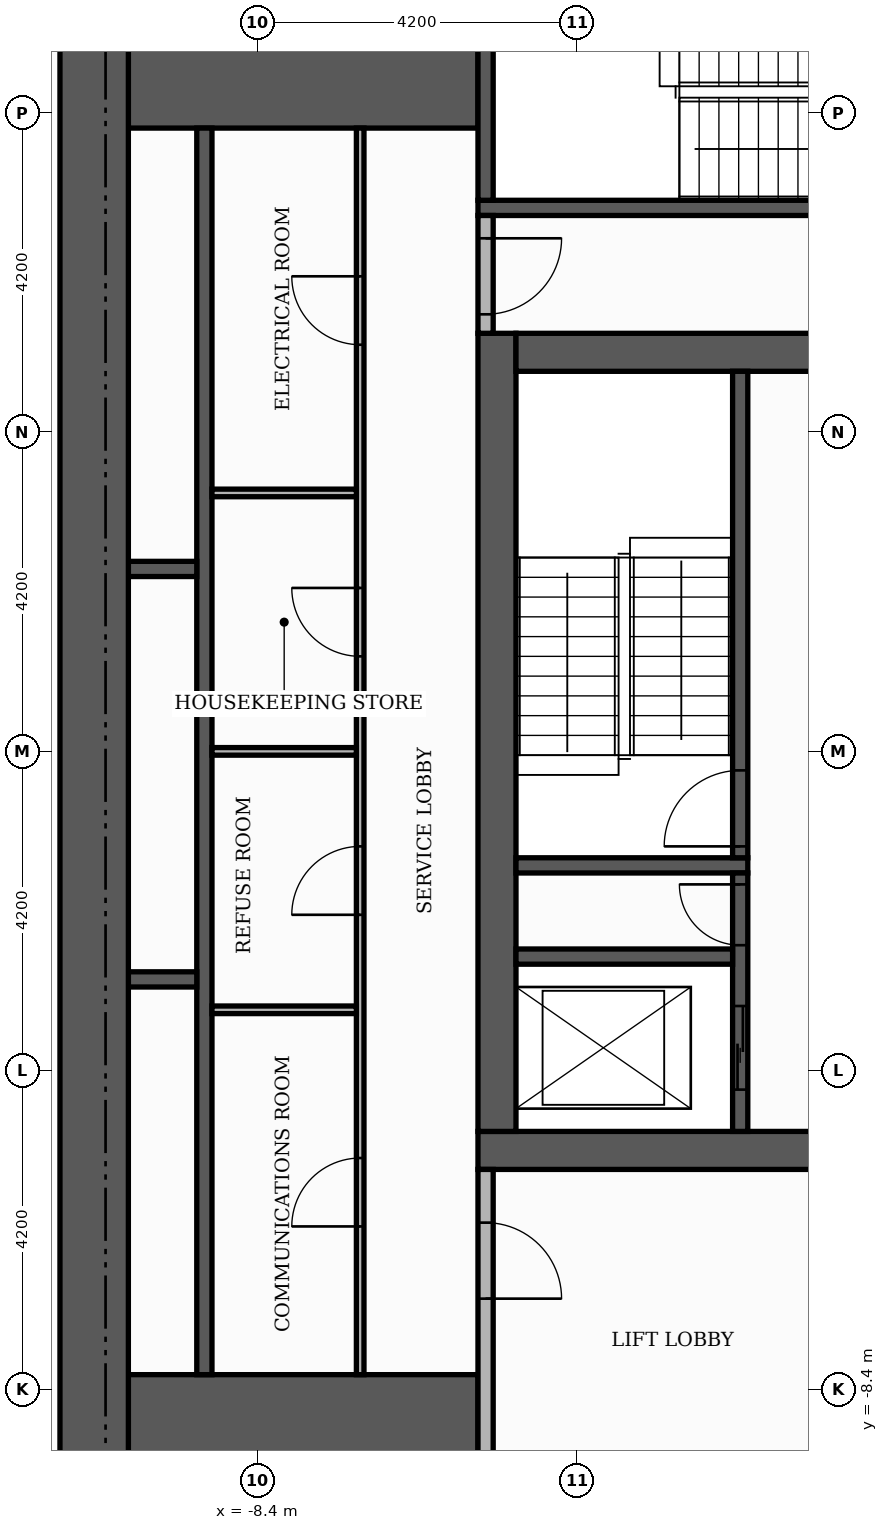
"""IFC4 building model, lengths in metres.
Left out: names, types, materials, properties, quantities, classifications, styles, units other than length and angle.
Written with IfcOpenShell. Run it as: python <this file> out.ifc"""

import sys

from ifc_helpers import new_model, si_unit, direction, frame, frame_2d, origin, place, context, subcontext, project, spatial, rectangle, extrude, element, fill, save


model = new_model("IFC4")
c1 = context("Model", 3, precision=1e-05, world=origin(), true_north=direction((0.0, 1.0)))
c2 = subcontext(c1, "Body", "Model", "MODEL_VIEW")
j1 = project(units=[si_unit("LENGTHUNIT", "METRE"), si_unit("PLANEANGLEUNIT", "RADIAN")], contexts=[c1])
p1 = place(None, origin())
s1 = spatial("IfcSite", under=j1, at=p1, CompositionType="ELEMENT")
p2 = place(p1, origin())
s2 = spatial("IfcBuilding", under=s1, at=p2, CompositionType="ELEMENT")
p3 = place(p2, frame((0.0, 0.0, 200.1)))
s3 = spatial("IfcBuildingStorey", under=s2, at=p3, CompositionType="ELEMENT", Elevation=200.1)
p4 = place(p3, frame((-5.5, -5.25, 0.0), z_axis=(0.0, 0.0, 1.0), x_axis=(1.0, 0.0, 0.0)))
e1 = element("IfcWall", 1, at=p4, inside=s3, PredefinedType="SHEAR", context=c2, shape_type="SweptSolid", body=[
    extrude(rectangle(XDim=11.0, YDim=0.5, at=frame_2d((5.5, 0.0))), origin(), (0.0, 0.0, 1.0), 3.48),
])
p5 = place(p4, frame((4.9, 0.0, 0.0)))
e2 = element("IfcOpeningElement", 2, at=p5, cuts=e1, PredefinedType="OPENING", context=c2, shape_type="SweptSolid", body=[
    extrude(rectangle(XDim=1.2, YDim=2.1, at=frame_2d((0.6, 1.05))), frame((0.0, 0.26, 0.0), z_axis=(0.0, -1.0, 0.0), x_axis=(1.0, 0.0, 0.0)), (0.0, 0.0, 1.0), 0.52),
])
p6 = place(p3, frame((-5.25, -5.0, 0.0), z_axis=(0.0, 0.0, 1.0), x_axis=(0.0, 1.0, 0.0)))
e3 = element("IfcWall", 3, at=p6, inside=s3, PredefinedType="SHEAR", context=c2, shape_type="SweptSolid", body=[
    extrude(rectangle(XDim=10.5, YDim=0.5, at=frame_2d((5.25, 0.0))), origin(), (0.0, 0.0, 1.0), 3.48),
])
p7 = place(p3, frame((-5.0, 5.25, 0.0), z_axis=(0.0, 0.0, 1.0), x_axis=(1.0, 0.0, 0.0)))
e4 = element("IfcWall", 4, at=p7, inside=s3, PredefinedType="SHEAR", context=c2, shape_type="SweptSolid", body=[
    extrude(rectangle(XDim=10.0, YDim=0.5, at=frame_2d((5.0, 0.0))), origin(), (0.0, 0.0, 1.0), 3.48),
])
p8 = place(p7, frame((4.4, 0.0, 0.0)))
e5 = element("IfcOpeningElement", 5, at=p8, cuts=e4, PredefinedType="OPENING", context=c2, shape_type="SweptSolid", body=[
    extrude(rectangle(XDim=1.2, YDim=2.1, at=frame_2d((0.6, 1.05))), frame((0.0, 0.26, 0.0), z_axis=(0.0, -1.0, 0.0), x_axis=(1.0, 0.0, 0.0)), (0.0, 0.0, 1.0), 0.52),
])
for number, where, z_axis, x_axis in (
    (6, (-10.1, -9.15, 0.0), (0.0, 0.0, 1.0), (1.0, 0.0, 0.0)),
    (7, (-10.1, 9.15, 0.0), (0.0, 0.0, 1.0), (1.0, 0.0, 0.0)),
):
    element("IfcWall", number, at=place(p3, frame(where, z_axis=z_axis, x_axis=x_axis)), inside=s3, PredefinedType="SHEAR", context=c2, shape_type="SweptSolid", body=[
        extrude(rectangle(XDim=4.6, YDim=1.9, at=frame_2d((2.3, 0.0))), origin(), (0.0, 0.0, 1.0), 3.48),
    ])
p9 = place(p3, frame((-5.0, -1.5, 0.0), z_axis=(0.0, 0.0, 1.0), x_axis=(1.0, 0.0, 0.0)))
e8 = element("IfcWall", 8, at=p9, inside=s3, PredefinedType="SHEAR", context=c2, shape_type="SweptSolid", body=[
    extrude(rectangle(XDim=3.05, YDim=0.2, at=frame_2d((1.525, 0.0))), origin(), (0.0, 0.0, 1.0), 3.48),
])
p10 = place(p3, frame((-2.05, -1.4, 0.0), z_axis=(0.0, 0.0, 1.0), x_axis=(0.0, 1.0, 0.0)))
e9 = element("IfcWall", 9, at=p10, inside=s3, PredefinedType="SHEAR", context=c2, shape_type="SweptSolid", body=[
    extrude(rectangle(XDim=6.4, YDim=0.2, at=frame_2d((3.2, 0.0))), origin(), (0.0, 0.0, 1.0), 3.48),
])
p11 = place(p10, frame((0.15, 0.0, 0.0)))
e10 = element("IfcOpeningElement", 10, at=p11, cuts=e9, PredefinedType="OPENING", context=c2, shape_type="SweptSolid", body=[
    extrude(rectangle(XDim=1.0, YDim=2.1, at=frame_2d((0.5, 1.05))), frame((0.0, 0.11, 0.0), z_axis=(0.0, -1.0, 0.0), x_axis=(1.0, 0.0, 0.0)), (0.0, 0.0, 1.0), 0.22),
])
p12 = place(p3, frame((-5.5, 7.15, 0.0), z_axis=(0.0, 0.0, 1.0), x_axis=(1.0, 0.0, 0.0)))
e11 = element("IfcWall", 11, at=p12, inside=s3, PredefinedType="SHEAR", context=c2, shape_type="SweptSolid", body=[
    extrude(rectangle(XDim=6.8, YDim=0.2, at=frame_2d((3.4, 0.0))), origin(), (0.0, 0.0, 1.0), 3.48),
])
p13 = place(p3, frame((-5.4, 7.25, 0.0), z_axis=(0.0, 0.0, 1.0), x_axis=(0.0, 1.0, 0.0)))
e12 = element("IfcWall", 12, at=p13, inside=s3, PredefinedType="SHEAR", context=c2, shape_type="SweptSolid", body=[
    extrude(rectangle(XDim=2.85, YDim=0.2, at=frame_2d((1.425, 0.0))), origin(), (0.0, 0.0, 1.0), 3.48),
])
p14 = place(p3, frame((-9.1, -8.2, 0.0), z_axis=(0.0, 0.0, 1.0), x_axis=(0.0, 1.0, 0.0)))
e13 = element("IfcWall", 13, at=p14, inside=s3, PredefinedType="SHEAR", context=c2, shape_type="SweptSolid", body=[
    extrude(rectangle(XDim=16.4, YDim=0.2, at=frame_2d((8.2, 0.0))), origin(), (0.0, 0.0, 1.0), 3.48),
])
p15 = place(p3, frame((-2.05, -5.0, 0.0), z_axis=(0.0, 0.0, 1.0), x_axis=(0.0, 1.0, 0.0)))
e14 = element("IfcWall", 14, at=p15, inside=s3, PredefinedType="SHEAR", context=c2, shape_type="SweptSolid", body=[
    extrude(rectangle(XDim=3.4, YDim=0.2, at=frame_2d((1.7, 0.0))), origin(), (0.0, 0.0, 1.0), 3.48),
])
p16 = place(p15, frame((0.55, 0.0, 0.0)))
e15 = element("IfcOpeningElement", 15, at=p16, cuts=e14, PredefinedType="OPENING", context=c2, shape_type="SweptSolid", body=[
    extrude(rectangle(XDim=1.1, YDim=2.1, at=frame_2d((0.55, 1.05))), frame((0.0, 0.11, 0.0), z_axis=(0.0, -1.0, 0.0), x_axis=(1.0, 0.0, 0.0)), (0.0, 0.0, 1.0), 0.22),
])
p17 = place(p15, frame((2.45, 0.0, 0.0)))
e16 = element("IfcOpeningElement", 16, at=p17, cuts=e14, PredefinedType="OPENING", context=c2, shape_type="SweptSolid", body=[
    extrude(rectangle(XDim=0.8, YDim=2.1, at=frame_2d((0.4, 1.05))), frame((0.0, 0.11, 0.0), z_axis=(0.0, -1.0, 0.0), x_axis=(1.0, 0.0, 0.0)), (0.0, 0.0, 1.0), 0.22),
])
p18 = place(p3, frame((-10.1, -3.0, 0.0), z_axis=(0.0, 0.0, 1.0), x_axis=(1.0, 0.0, 0.0)))
e17 = element("IfcWall", 17, at=p18, inside=s3, PredefinedType="SHEAR", context=c2, shape_type="SweptSolid", body=[
    extrude(rectangle(XDim=0.9, YDim=0.2, at=frame_2d((0.45, 0.0))), origin(), (0.0, 0.0, 1.0), 3.48),
])
p19 = place(p3, frame((-5.0, -2.7, 0.0), z_axis=(0.0, 0.0, 1.0), x_axis=(1.0, 0.0, 0.0)))
e18 = element("IfcWall", 18, at=p19, inside=s3, PredefinedType="SHEAR", context=c2, shape_type="SweptSolid", body=[
    extrude(rectangle(XDim=2.85, YDim=0.2, at=frame_2d((1.425, 0.0))), origin(), (0.0, 0.0, 1.0), 3.48),
])
p20 = place(p3, frame((-10.1, 2.4, 0.0), z_axis=(0.0, 0.0, 1.0), x_axis=(1.0, 0.0, 0.0)))
e19 = element("IfcWall", 19, at=p20, inside=s3, PredefinedType="SHEAR", context=c2, shape_type="SweptSolid", body=[
    extrude(rectangle(XDim=0.9, YDim=0.2, at=frame_2d((0.45, 0.0))), origin(), (0.0, 0.0, 1.0), 3.48),
])
p21 = place(p3, frame((-10.55, -10.1, 0.0), z_axis=(0.0, 0.0, 1.0), x_axis=(0.0, 1.0, 0.0)))
e20 = element("IfcWall", 20, at=p21, inside=s3, PredefinedType="SHEAR", context=c2, shape_type="SweptSolid", body=[
    extrude(rectangle(XDim=20.2, YDim=0.9, at=frame_2d((10.1, 0.0))), origin(), (0.0, 0.0, 1.0), 3.48),
])
p22 = place(p3, frame((-5.4, -10.1, 0.0), z_axis=(0.0, 0.0, 1.0), x_axis=(0.0, 1.0, 0.0)))
e21 = element("IfcWall", 21, at=p22, inside=s3, PredefinedType="PARTITIONING", context=c2, shape_type="SweptSolid", body=[
    extrude(rectangle(XDim=4.6, YDim=0.2, at=frame_2d((2.3, 0.0))), origin(), (0.0, 0.0, 1.0), 3.48),
])
p23 = place(p22, frame((2.9, 0.0, 0.0)))
e22 = element("IfcOpeningElement", 22, at=p23, cuts=e21, PredefinedType="OPENING", context=c2, shape_type="SweptSolid", body=[
    extrude(rectangle(XDim=1.0, YDim=2.1, at=frame_2d((0.5, 1.05))), frame((0.0, 0.11, 0.0), z_axis=(0.0, -1.0, 0.0), x_axis=(1.0, 0.0, 0.0)), (0.0, 0.0, 1.0), 0.22),
])
p24 = place(p3, frame((-7.05, -8.2, 0.0), z_axis=(0.0, 0.0, 1.0), x_axis=(0.0, 1.0, 0.0)))
e23 = element("IfcWall", 23, at=p24, inside=s3, PredefinedType="PARTITIONING", context=c2, shape_type="SweptSolid", body=[
    extrude(rectangle(XDim=16.4, YDim=0.1, at=frame_2d((8.2, 0.0))), origin(), (0.0, 0.0, 1.0), 3.48),
])
p25 = place(p24, frame((1.95, 0.0, 0.0)))
e24 = element("IfcOpeningElement", 24, at=p25, cuts=e23, PredefinedType="OPENING", context=c2, shape_type="SweptSolid", body=[
    extrude(rectangle(XDim=0.9, YDim=2.1, at=frame_2d((0.45, 1.05))), frame((0.0, 0.06, 0.0), z_axis=(0.0, -1.0, 0.0), x_axis=(1.0, 0.0, 0.0)), (0.0, 0.0, 1.0), 0.12),
])
p26 = place(p24, frame((6.05, 0.0, 0.0)))
e25 = element("IfcOpeningElement", 25, at=p26, cuts=e23, PredefinedType="OPENING", context=c2, shape_type="SweptSolid", body=[
    extrude(rectangle(XDim=0.9, YDim=2.1, at=frame_2d((0.45, 1.05))), frame((0.0, 0.06, 0.0), z_axis=(0.0, -1.0, 0.0), x_axis=(1.0, 0.0, 0.0)), (0.0, 0.0, 1.0), 0.12),
])
p27 = place(p24, frame((9.45, 0.0, 0.0)))
e26 = element("IfcOpeningElement", 26, at=p27, cuts=e23, PredefinedType="OPENING", context=c2, shape_type="SweptSolid", body=[
    extrude(rectangle(XDim=0.9, YDim=2.1, at=frame_2d((0.45, 1.05))), frame((0.0, 0.06, 0.0), z_axis=(0.0, -1.0, 0.0), x_axis=(1.0, 0.0, 0.0)), (0.0, 0.0, 1.0), 0.12),
])
p28 = place(p24, frame((13.55, 0.0, 0.0)))
e27 = element("IfcOpeningElement", 27, at=p28, cuts=e23, PredefinedType="OPENING", context=c2, shape_type="SweptSolid", body=[
    extrude(rectangle(XDim=0.9, YDim=2.1, at=frame_2d((0.45, 1.05))), frame((0.0, 0.06, 0.0), z_axis=(0.0, -1.0, 0.0), x_axis=(1.0, 0.0, 0.0)), (0.0, 0.0, 1.0), 0.12),
])
for number, where, z_axis, x_axis in (
    (28, (-9.0, -3.4, 0.0), (0.0, 0.0, 1.0), (1.0, 0.0, 0.0)),
    (29, (-9.0, 0.0, 0.0), (0.0, 0.0, 1.0), (1.0, 0.0, 0.0)),
    (30, (-9.0, 3.4, 0.0), (0.0, 0.0, 1.0), (1.0, 0.0, 0.0)),
):
    element("IfcWall", number, at=place(p3, frame(where, z_axis=z_axis, x_axis=x_axis)), inside=s3, PredefinedType="PARTITIONING", context=c2, shape_type="SweptSolid", body=[
        extrude(rectangle(XDim=1.9, YDim=0.1, at=frame_2d((0.95, 0.0))), origin(), (0.0, 0.0, 1.0), 3.48),
    ])
p29 = place(p3, frame((-5.4, 5.5, 0.0), z_axis=(0.0, 0.0, 1.0), x_axis=(0.0, 1.0, 0.0)))
e31 = element("IfcWall", 31, at=p29, inside=s3, PredefinedType="PARTITIONING", context=c2, shape_type="SweptSolid", body=[
    extrude(rectangle(XDim=1.55, YDim=0.2, at=frame_2d((0.775, 0.0))), origin(), (0.0, 0.0, 1.0), 3.48),
])
p30 = place(p29, frame((0.25, 0.0, 0.0)))
e32 = element("IfcOpeningElement", 32, at=p30, cuts=e31, PredefinedType="OPENING", context=c2, shape_type="SweptSolid", body=[
    extrude(rectangle(XDim=1.0, YDim=2.1, at=frame_2d((0.5, 1.05))), frame((0.0, 0.11, 0.0), z_axis=(0.0, -1.0, 0.0), x_axis=(1.0, 0.0, 0.0)), (0.0, 0.0, 1.0), 0.22),
])
p31 = place(p16, origin())
e33 = element("IfcDoor", 33, at=p31, inside=s3, OperationType="SLIDING_TO_LEFT", PredefinedType="DOOR", context=c2, shape_type="SweptSolid", body=[
    extrude(rectangle(XDim=1.1, YDim=2.1, at=frame_2d((0.55, 1.05))), frame((0.0, 0.025, 0.0), z_axis=(0.0, -1.0, 0.0), x_axis=(1.0, 0.0, 0.0)), (0.0, 0.0, 1.0), 0.05),
])
fill(e15, e33)
p32 = place(p11, origin())
e34 = element("IfcDoor", 34, at=p32, inside=s3, OperationType="SINGLE_SWING_LEFT", PredefinedType="DOOR", context=c2, shape_type="SweptSolid", body=[
    extrude(rectangle(XDim=1.0, YDim=2.1, at=frame_2d((0.5, 1.05))), frame((0.0, 0.025, 0.0), z_axis=(0.0, -1.0, 0.0), x_axis=(1.0, 0.0, 0.0)), (0.0, 0.0, 1.0), 0.05),
])
fill(e10, e34)
p33 = place(p17, origin())
e35 = element("IfcDoor", 35, at=p33, inside=s3, OperationType="SINGLE_SWING_RIGHT", PredefinedType="DOOR", context=c2, shape_type="SweptSolid", body=[
    extrude(rectangle(XDim=0.8, YDim=2.1, at=frame_2d((0.4, 1.05))), frame((0.0, 0.025, 0.0), z_axis=(0.0, -1.0, 0.0), x_axis=(1.0, 0.0, 0.0)), (0.0, 0.0, 1.0), 0.05),
])
fill(e16, e35)
p34 = place(p30, frame((1.0, 0.0, 0.0), z_axis=(0.0, 0.0, 1.0), x_axis=(-1.0, 0.0, 0.0)))
e36 = element("IfcDoor", 36, at=p34, inside=s3, OperationType="SINGLE_SWING_RIGHT", PredefinedType="DOOR", context=c2, shape_type="SweptSolid", body=[
    extrude(rectangle(XDim=1.0, YDim=2.1, at=frame_2d((0.5, 1.05))), frame((0.0, 0.025, 0.0), z_axis=(0.0, -1.0, 0.0), x_axis=(1.0, 0.0, 0.0)), (0.0, 0.0, 1.0), 0.05),
])
fill(e32, e36)
p35 = place(p23, frame((1.0, 0.0, 0.0), z_axis=(0.0, 0.0, 1.0), x_axis=(-1.0, 0.0, 0.0)))
e37 = element("IfcDoor", 37, at=p35, inside=s3, OperationType="SINGLE_SWING_LEFT", PredefinedType="DOOR", context=c2, shape_type="SweptSolid", body=[
    extrude(rectangle(XDim=1.0, YDim=2.1, at=frame_2d((0.5, 1.05))), frame((0.0, 0.025, 0.0), z_axis=(0.0, -1.0, 0.0), x_axis=(1.0, 0.0, 0.0)), (0.0, 0.0, 1.0), 0.05),
])
fill(e22, e37)
p36 = place(p25, origin())
e38 = element("IfcDoor", 38, at=p36, inside=s3, OperationType="SINGLE_SWING_LEFT", PredefinedType="DOOR", context=c2, shape_type="SweptSolid", body=[
    extrude(rectangle(XDim=0.9, YDim=2.1, at=frame_2d((0.45, 1.05))), frame((0.0, 0.025, 0.0), z_axis=(0.0, -1.0, 0.0), x_axis=(1.0, 0.0, 0.0)), (0.0, 0.0, 1.0), 0.05),
])
fill(e24, e38)
p37 = place(p26, origin())
e39 = element("IfcDoor", 39, at=p37, inside=s3, OperationType="SINGLE_SWING_LEFT", PredefinedType="DOOR", context=c2, shape_type="SweptSolid", body=[
    extrude(rectangle(XDim=0.9, YDim=2.1, at=frame_2d((0.45, 1.05))), frame((0.0, 0.025, 0.0), z_axis=(0.0, -1.0, 0.0), x_axis=(1.0, 0.0, 0.0)), (0.0, 0.0, 1.0), 0.05),
])
fill(e25, e39)
p38 = place(p27, origin())
e40 = element("IfcDoor", 40, at=p38, inside=s3, OperationType="SINGLE_SWING_RIGHT", PredefinedType="DOOR", context=c2, shape_type="SweptSolid", body=[
    extrude(rectangle(XDim=0.9, YDim=2.1, at=frame_2d((0.45, 1.05))), frame((0.0, 0.025, 0.0), z_axis=(0.0, -1.0, 0.0), x_axis=(1.0, 0.0, 0.0)), (0.0, 0.0, 1.0), 0.05),
])
fill(e26, e40)
p39 = place(p28, origin())
e41 = element("IfcDoor", 41, at=p39, inside=s3, OperationType="SINGLE_SWING_RIGHT", PredefinedType="DOOR", context=c2, shape_type="SweptSolid", body=[
    extrude(rectangle(XDim=0.9, YDim=2.1, at=frame_2d((0.45, 1.05))), frame((0.0, 0.025, 0.0), z_axis=(0.0, -1.0, 0.0), x_axis=(1.0, 0.0, 0.0)), (0.0, 0.0, 1.0), 0.05),
])
fill(e27, e41)
save(model, sys.argv[1])
